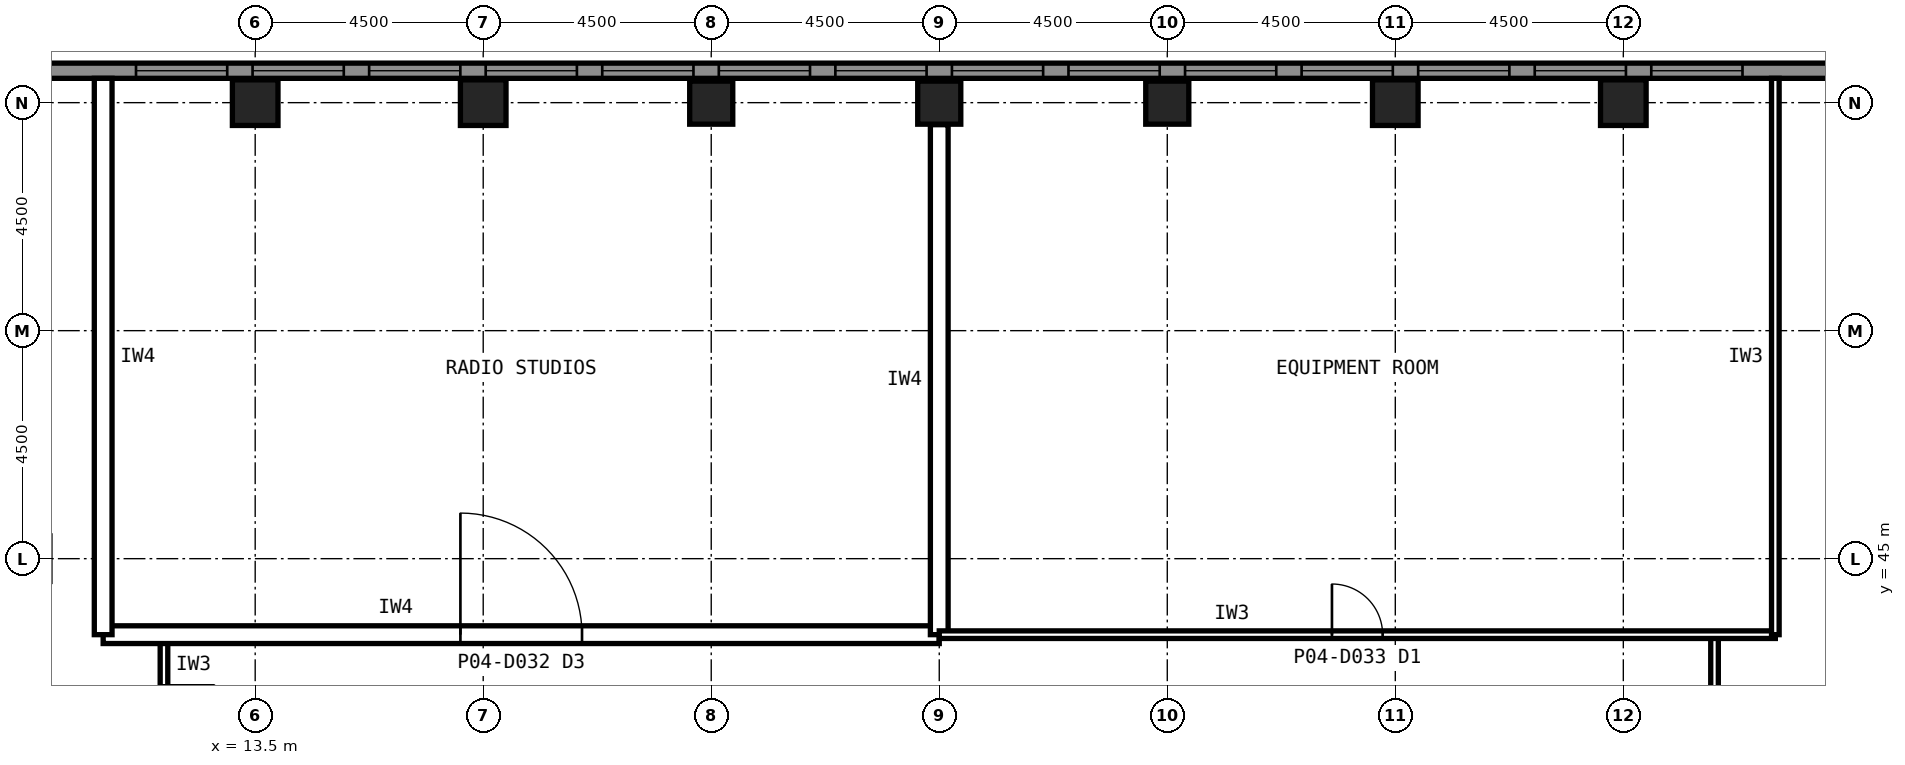
"""IFC4 building model, lengths in metres.
Left out: names, types, materials, properties, quantities, classifications, styles, units other than length and angle.
Written with IfcOpenShell. Run it as: python <this file> out.ifc"""

import sys

from ifc_helpers import new_model, si_unit, direction, frame, frame_2d, origin, origin_2d, place, context, subcontext, project, spatial, rectangle, hollow_rectangle, extrude, element, fill, save


model = new_model("IFC4")
c1 = context("Model", 3, precision=1e-05, world=origin(), true_north=direction((0.0, 1.0)))
c2 = subcontext(c1, "Body", "Model", "MODEL_VIEW")
j1 = project(units=[si_unit("LENGTHUNIT", "METRE"), si_unit("PLANEANGLEUNIT", "RADIAN")], contexts=[c1])
p1 = place(None, origin())
s1 = spatial("IfcSite", under=j1, at=p1, CompositionType="ELEMENT")
p2 = place(p1, origin())
s2 = spatial("IfcBuilding", under=s1, at=p2, CompositionType="ELEMENT")
p3 = place(p2, frame((0.0, 0.0, 18.0)))
s3 = spatial("IfcBuildingStorey", under=s2, at=p3, CompositionType="ELEMENT", Elevation=18.0)
for number, where, z_axis, x_axis in (
    (1, (40.5, 54.0, 0.0), (0.0, 0.0, 1.0), (1.0, 0.0, 0.0)),
    (2, (36.0, 54.0, 0.0), (0.0, 0.0, 1.0), (1.0, 0.0, 0.0)),
):
    element("IfcColumn", number, at=place(p3, frame(where, z_axis=z_axis, x_axis=x_axis)), inside=s3, PredefinedType="COLUMN", context=c2, shape_type="SweptSolid", body=[
        extrude(hollow_rectangle(XDim=0.9, YDim=0.9, WallThickness=0.063, at=origin_2d()), origin(), (0.0, 0.0, 1.0), 5.0),
    ])
for number, where, z_axis, x_axis in (
    (3, (31.5, 54.0, 0.0), (0.0, 0.0, 1.0), (1.0, 0.0, 0.0)),
    (4, (27.0, 54.0, 0.0), (0.0, 0.0, 1.0), (1.0, 0.0, 0.0)),
    (5, (22.5, 54.0, 0.0), (0.0, 0.0, 1.0), (1.0, 0.0, 0.0)),
):
    element("IfcColumn", number, at=place(p3, frame(where, z_axis=z_axis, x_axis=x_axis)), inside=s3, PredefinedType="COLUMN", context=c2, shape_type="SweptSolid", body=[
        extrude(hollow_rectangle(XDim=0.85, YDim=0.85, WallThickness=0.05, at=origin_2d()), origin(), (0.0, 0.0, 1.0), 5.0),
    ])
for number, where, z_axis, x_axis in (
    (6, (18.0, 54.0, 0.0), (0.0, 0.0, 1.0), (1.0, 0.0, 0.0)),
    (7, (13.5, 54.0, 0.0), (0.0, 0.0, 1.0), (1.0, 0.0, 0.0)),
):
    element("IfcColumn", number, at=place(p3, frame(where, z_axis=z_axis, x_axis=x_axis)), inside=s3, PredefinedType="COLUMN", context=c2, shape_type="SweptSolid", body=[
        extrude(hollow_rectangle(XDim=0.9, YDim=0.9, WallThickness=0.063, at=origin_2d()), origin(), (0.0, 0.0, 1.0), 5.0),
    ])
p4 = place(p3, frame((8.598, 54.63, 0.0), z_axis=(0.0, 0.0, 1.0), x_axis=(1.0, 0.0, 0.0)))
e8 = element("IfcWall", 8, at=p4, inside=s3, PredefinedType="SOLIDWALL", context=c2, shape_type="SweptSolid", body=[
    extrude(rectangle(XDim=36.805, YDim=0.3, at=frame_2d((18.402, 0.0))), origin(), (0.0, 0.0, 1.0), 5.0),
])
p5 = place(p4, frame((2.551, 0.0, 1.1)))
e9 = element("IfcOpeningElement", 9, at=p5, cuts=e8, PredefinedType="OPENING", context=c2, shape_type="SweptSolid", body=[
    extrude(rectangle(XDim=1.8, YDim=1.2, at=frame_2d((0.9, 0.6))), frame((0.0, 0.16, 0.0), z_axis=(0.0, -1.0, 0.0), x_axis=(1.0, 0.0, 0.0)), (0.0, 0.0, 1.0), 0.32),
])
p6 = place(p4, frame((4.851, 0.0, 1.1)))
e10 = element("IfcOpeningElement", 10, at=p6, cuts=e8, PredefinedType="OPENING", context=c2, shape_type="SweptSolid", body=[
    extrude(rectangle(XDim=1.8, YDim=1.2, at=frame_2d((0.9, 0.6))), frame((0.0, 0.16, 0.0), z_axis=(0.0, -1.0, 0.0), x_axis=(1.0, 0.0, 0.0)), (0.0, 0.0, 1.0), 0.32),
])
p7 = place(p4, frame((7.151, 0.0, 1.1)))
e11 = element("IfcOpeningElement", 11, at=p7, cuts=e8, PredefinedType="OPENING", context=c2, shape_type="SweptSolid", body=[
    extrude(rectangle(XDim=1.8, YDim=1.2, at=frame_2d((0.9, 0.6))), frame((0.0, 0.16, 0.0), z_axis=(0.0, -1.0, 0.0), x_axis=(1.0, 0.0, 0.0)), (0.0, 0.0, 1.0), 0.32),
])
p8 = place(p4, frame((9.451, 0.0, 1.1)))
e12 = element("IfcOpeningElement", 12, at=p8, cuts=e8, PredefinedType="OPENING", context=c2, shape_type="SweptSolid", body=[
    extrude(rectangle(XDim=1.8, YDim=1.2, at=frame_2d((0.9, 0.6))), frame((0.0, 0.16, 0.0), z_axis=(0.0, -1.0, 0.0), x_axis=(1.0, 0.0, 0.0)), (0.0, 0.0, 1.0), 0.32),
])
p9 = place(p4, frame((11.752, 0.0, 1.1)))
e13 = element("IfcOpeningElement", 13, at=p9, cuts=e8, PredefinedType="OPENING", context=c2, shape_type="SweptSolid", body=[
    extrude(rectangle(XDim=1.8, YDim=1.2, at=frame_2d((0.9, 0.6))), frame((0.0, 0.16, 0.0), z_axis=(0.0, -1.0, 0.0), x_axis=(1.0, 0.0, 0.0)), (0.0, 0.0, 1.0), 0.32),
])
p10 = place(p4, frame((14.052, 0.0, 1.1)))
e14 = element("IfcOpeningElement", 14, at=p10, cuts=e8, PredefinedType="OPENING", context=c2, shape_type="SweptSolid", body=[
    extrude(rectangle(XDim=1.8, YDim=1.2, at=frame_2d((0.9, 0.6))), frame((0.0, 0.16, 0.0), z_axis=(0.0, -1.0, 0.0), x_axis=(1.0, 0.0, 0.0)), (0.0, 0.0, 1.0), 0.32),
])
p11 = place(p4, frame((16.352, 0.0, 1.1)))
e15 = element("IfcOpeningElement", 15, at=p11, cuts=e8, PredefinedType="OPENING", context=c2, shape_type="SweptSolid", body=[
    extrude(rectangle(XDim=1.8, YDim=1.2, at=frame_2d((0.9, 0.6))), frame((0.0, 0.16, 0.0), z_axis=(0.0, -1.0, 0.0), x_axis=(1.0, 0.0, 0.0)), (0.0, 0.0, 1.0), 0.32),
])
p12 = place(p4, frame((18.653, 0.0, 1.1)))
e16 = element("IfcOpeningElement", 16, at=p12, cuts=e8, PredefinedType="OPENING", context=c2, shape_type="SweptSolid", body=[
    extrude(rectangle(XDim=1.8, YDim=1.2, at=frame_2d((0.9, 0.6))), frame((0.0, 0.16, 0.0), z_axis=(0.0, -1.0, 0.0), x_axis=(1.0, 0.0, 0.0)), (0.0, 0.0, 1.0), 0.32),
])
p13 = place(p4, frame((20.953, 0.0, 1.1)))
e17 = element("IfcOpeningElement", 17, at=p13, cuts=e8, PredefinedType="OPENING", context=c2, shape_type="SweptSolid", body=[
    extrude(rectangle(XDim=1.8, YDim=1.2, at=frame_2d((0.9, 0.6))), frame((0.0, 0.16, 0.0), z_axis=(0.0, -1.0, 0.0), x_axis=(1.0, 0.0, 0.0)), (0.0, 0.0, 1.0), 0.32),
])
p14 = place(p4, frame((23.253, 0.0, 1.1)))
e18 = element("IfcOpeningElement", 18, at=p14, cuts=e8, PredefinedType="OPENING", context=c2, shape_type="SweptSolid", body=[
    extrude(rectangle(XDim=1.8, YDim=1.2, at=frame_2d((0.9, 0.6))), frame((0.0, 0.16, 0.0), z_axis=(0.0, -1.0, 0.0), x_axis=(1.0, 0.0, 0.0)), (0.0, 0.0, 1.0), 0.32),
])
p15 = place(p4, frame((25.553, 0.0, 1.1)))
e19 = element("IfcOpeningElement", 19, at=p15, cuts=e8, PredefinedType="OPENING", context=c2, shape_type="SweptSolid", body=[
    extrude(rectangle(XDim=1.8, YDim=1.2, at=frame_2d((0.9, 0.6))), frame((0.0, 0.16, 0.0), z_axis=(0.0, -1.0, 0.0), x_axis=(1.0, 0.0, 0.0)), (0.0, 0.0, 1.0), 0.32),
])
p16 = place(p4, frame((27.854, 0.0, 1.1)))
e20 = element("IfcOpeningElement", 20, at=p16, cuts=e8, PredefinedType="OPENING", context=c2, shape_type="SweptSolid", body=[
    extrude(rectangle(XDim=1.8, YDim=1.2, at=frame_2d((0.9, 0.6))), frame((0.0, 0.16, 0.0), z_axis=(0.0, -1.0, 0.0), x_axis=(1.0, 0.0, 0.0)), (0.0, 0.0, 1.0), 0.32),
])
p17 = place(p4, frame((30.154, 0.0, 1.1)))
e21 = element("IfcOpeningElement", 21, at=p17, cuts=e8, PredefinedType="OPENING", context=c2, shape_type="SweptSolid", body=[
    extrude(rectangle(XDim=1.8, YDim=1.2, at=frame_2d((0.9, 0.6))), frame((0.0, 0.16, 0.0), z_axis=(0.0, -1.0, 0.0), x_axis=(1.0, 0.0, 0.0)), (0.0, 0.0, 1.0), 0.32),
])
p18 = place(p4, frame((32.454, 0.0, 1.1)))
e22 = element("IfcOpeningElement", 22, at=p18, cuts=e8, PredefinedType="OPENING", context=c2, shape_type="SweptSolid", body=[
    extrude(rectangle(XDim=1.8, YDim=1.2, at=frame_2d((0.9, 0.6))), frame((0.0, 0.16, 0.0), z_axis=(0.0, -1.0, 0.0), x_axis=(1.0, 0.0, 0.0)), (0.0, 0.0, 1.0), 0.32),
])
p19 = place(p3, frame((42.3, 36.0, 0.0), z_axis=(0.0, 0.0, 1.0), x_axis=(0.0, 1.0, 0.0)))
e23 = element("IfcWall", 23, at=p19, inside=s3, PredefinedType="PARTITIONING", context=c2, shape_type="SweptSolid", body=[
    extrude(rectangle(XDim=7.5, YDim=0.15, at=frame_2d((3.75, 0.0))), origin(), (0.0, 0.0, 1.0), 4.8),
])
p20 = place(p19, frame((3.25, 0.0, 0.0)))
e24 = element("IfcOpeningElement", 24, at=p20, cuts=e23, PredefinedType="OPENING", context=c2, shape_type="SweptSolid", body=[
    extrude(rectangle(XDim=1.0, YDim=2.1, at=frame_2d((0.5, 1.05))), frame((0.0, 0.085, 0.0), z_axis=(0.0, -1.0, 0.0), x_axis=(1.0, 0.0, 0.0)), (0.0, 0.0, 1.0), 0.17),
])
p21 = place(p3, frame((11.7, 43.5, 0.0), z_axis=(0.0, 0.0, 1.0), x_axis=(0.0, -1.0, 0.0)))
e25 = element("IfcWall", 25, at=p21, inside=s3, PredefinedType="PARTITIONING", context=c2, shape_type="SweptSolid", body=[
    extrude(rectangle(XDim=3.0, YDim=0.15, at=frame_2d((1.5, 0.0))), origin(), (0.0, 0.0, 1.0), 4.8),
])
p22 = place(p21, frame((1.0, 0.0, 0.0)))
e26 = element("IfcOpeningElement", 26, at=p22, cuts=e25, PredefinedType="OPENING", context=c2, shape_type="SweptSolid", body=[
    extrude(rectangle(XDim=1.0, YDim=2.1, at=frame_2d((0.5, 1.05))), frame((0.0, 0.085, 0.0), z_axis=(0.0, -1.0, 0.0), x_axis=(1.0, 0.0, 0.0)), (0.0, 0.0, 1.0), 0.17),
])
p23 = place(p3, frame((10.5, 43.5, 0.0), z_axis=(0.0, 0.0, 1.0), x_axis=(1.0, 0.0, 0.0)))
e27 = element("IfcWall", 27, at=p23, inside=s3, PredefinedType="PARTITIONING", context=c2, shape_type="SweptSolid", body=[
    extrude(rectangle(XDim=16.5, YDim=0.35, at=frame_2d((8.25, 0.0))), origin(), (0.0, 0.0, 1.0), 4.8),
])
p24 = place(p23, frame((7.05, 0.0, 0.0)))
e28 = element("IfcOpeningElement", 28, at=p24, cuts=e27, PredefinedType="OPENING", context=c2, shape_type="SweptSolid", body=[
    extrude(rectangle(XDim=2.4, YDim=3.0, at=frame_2d((1.2, 1.5))), frame((0.0, 0.185, 0.0), z_axis=(0.0, -1.0, 0.0), x_axis=(1.0, 0.0, 0.0)), (0.0, 0.0, 1.0), 0.37),
])
p25 = place(p3, frame((27.0, 43.5, 0.0), z_axis=(0.0, 0.0, 1.0), x_axis=(0.0, 1.0, 0.0)))
e29 = element("IfcWall", 29, at=p25, inside=s3, PredefinedType="PARTITIONING", context=c2, shape_type="SweptSolid", body=[
    extrude(rectangle(XDim=10.065, YDim=0.35, at=frame_2d((5.032, 0.0))), origin(), (0.0, 0.0, 1.0), 3.858),
])
p26 = place(p3, frame((10.5, 54.48, 0.0), z_axis=(0.0, 0.0, 1.0), x_axis=(0.0, -1.0, 0.0)))
e30 = element("IfcWall", 30, at=p26, inside=s3, PredefinedType="PARTITIONING", context=c2, shape_type="SweptSolid", body=[
    extrude(rectangle(XDim=10.98, YDim=0.35, at=frame_2d((5.49, 0.0))), origin(), (0.0, 0.0, 1.0), 4.8),
])
p27 = place(p3, frame((27.0, 43.5, 0.0), z_axis=(0.0, 0.0, 1.0), x_axis=(1.0, 0.0, 0.0)))
e31 = element("IfcWall", 31, at=p27, inside=s3, PredefinedType="PARTITIONING", context=c2, shape_type="SweptSolid", body=[
    extrude(rectangle(XDim=16.5, YDim=0.15, at=frame_2d((8.25, 0.0))), origin(), (0.0, 0.0, 1.0), 4.8),
])
p28 = place(p27, frame((7.75, 0.0, 0.0)))
e32 = element("IfcOpeningElement", 32, at=p28, cuts=e31, PredefinedType="OPENING", context=c2, shape_type="SweptSolid", body=[
    extrude(rectangle(XDim=1.0, YDim=2.1, at=frame_2d((0.5, 1.05))), frame((0.0, 0.085, 0.0), z_axis=(0.0, -1.0, 0.0), x_axis=(1.0, 0.0, 0.0)), (0.0, 0.0, 1.0), 0.17),
])
p29 = place(p3, frame((43.5, 43.5, 0.0), z_axis=(0.0, 0.0, 1.0), x_axis=(0.0, 1.0, 0.0)))
e33 = element("IfcWall", 33, at=p29, inside=s3, PredefinedType="PARTITIONING", context=c2, shape_type="SweptSolid", body=[
    extrude(rectangle(XDim=10.98, YDim=0.15, at=frame_2d((5.49, 0.0))), origin(), (0.0, 0.0, 1.0), 4.8),
])
p30 = place(p5, origin())
e34 = element("IfcWindow", 34, at=p30, inside=s3, PartitioningType="SINGLE_PANEL", PredefinedType="WINDOW", context=c2, shape_type="SweptSolid", body=[
    extrude(rectangle(XDim=1.8, YDim=1.2, at=frame_2d((0.9, 0.6))), frame((0.0, 0.03, 0.0), z_axis=(0.0, -1.0, 0.0), x_axis=(1.0, 0.0, 0.0)), (0.0, 0.0, 1.0), 0.06),
])
fill(e9, e34)
p31 = place(p6, origin())
e35 = element("IfcWindow", 35, at=p31, inside=s3, PartitioningType="SINGLE_PANEL", PredefinedType="WINDOW", context=c2, shape_type="SweptSolid", body=[
    extrude(rectangle(XDim=1.8, YDim=1.2, at=frame_2d((0.9, 0.6))), frame((0.0, 0.03, 0.0), z_axis=(0.0, -1.0, 0.0), x_axis=(1.0, 0.0, 0.0)), (0.0, 0.0, 1.0), 0.06),
])
fill(e10, e35)
p32 = place(p7, origin())
e36 = element("IfcWindow", 36, at=p32, inside=s3, PartitioningType="SINGLE_PANEL", PredefinedType="WINDOW", context=c2, shape_type="SweptSolid", body=[
    extrude(rectangle(XDim=1.8, YDim=1.2, at=frame_2d((0.9, 0.6))), frame((0.0, 0.03, 0.0), z_axis=(0.0, -1.0, 0.0), x_axis=(1.0, 0.0, 0.0)), (0.0, 0.0, 1.0), 0.06),
])
fill(e11, e36)
p33 = place(p8, origin())
e37 = element("IfcWindow", 37, at=p33, inside=s3, PartitioningType="SINGLE_PANEL", PredefinedType="WINDOW", context=c2, shape_type="SweptSolid", body=[
    extrude(rectangle(XDim=1.8, YDim=1.2, at=frame_2d((0.9, 0.6))), frame((0.0, 0.03, 0.0), z_axis=(0.0, -1.0, 0.0), x_axis=(1.0, 0.0, 0.0)), (0.0, 0.0, 1.0), 0.06),
])
fill(e12, e37)
p34 = place(p9, origin())
e38 = element("IfcWindow", 38, at=p34, inside=s3, PartitioningType="SINGLE_PANEL", PredefinedType="WINDOW", context=c2, shape_type="SweptSolid", body=[
    extrude(rectangle(XDim=1.8, YDim=1.2, at=frame_2d((0.9, 0.6))), frame((0.0, 0.03, 0.0), z_axis=(0.0, -1.0, 0.0), x_axis=(1.0, 0.0, 0.0)), (0.0, 0.0, 1.0), 0.06),
])
fill(e13, e38)
p35 = place(p10, origin())
e39 = element("IfcWindow", 39, at=p35, inside=s3, PartitioningType="SINGLE_PANEL", PredefinedType="WINDOW", context=c2, shape_type="SweptSolid", body=[
    extrude(rectangle(XDim=1.8, YDim=1.2, at=frame_2d((0.9, 0.6))), frame((0.0, 0.03, 0.0), z_axis=(0.0, -1.0, 0.0), x_axis=(1.0, 0.0, 0.0)), (0.0, 0.0, 1.0), 0.06),
])
fill(e14, e39)
p36 = place(p11, origin())
e40 = element("IfcWindow", 40, at=p36, inside=s3, PartitioningType="SINGLE_PANEL", PredefinedType="WINDOW", context=c2, shape_type="SweptSolid", body=[
    extrude(rectangle(XDim=1.8, YDim=1.2, at=frame_2d((0.9, 0.6))), frame((0.0, 0.03, 0.0), z_axis=(0.0, -1.0, 0.0), x_axis=(1.0, 0.0, 0.0)), (0.0, 0.0, 1.0), 0.06),
])
fill(e15, e40)
p37 = place(p12, origin())
e41 = element("IfcWindow", 41, at=p37, inside=s3, PartitioningType="SINGLE_PANEL", PredefinedType="WINDOW", context=c2, shape_type="SweptSolid", body=[
    extrude(rectangle(XDim=1.8, YDim=1.2, at=frame_2d((0.9, 0.6))), frame((0.0, 0.03, 0.0), z_axis=(0.0, -1.0, 0.0), x_axis=(1.0, 0.0, 0.0)), (0.0, 0.0, 1.0), 0.06),
])
fill(e16, e41)
p38 = place(p13, origin())
e42 = element("IfcWindow", 42, at=p38, inside=s3, PartitioningType="SINGLE_PANEL", PredefinedType="WINDOW", context=c2, shape_type="SweptSolid", body=[
    extrude(rectangle(XDim=1.8, YDim=1.2, at=frame_2d((0.9, 0.6))), frame((0.0, 0.03, 0.0), z_axis=(0.0, -1.0, 0.0), x_axis=(1.0, 0.0, 0.0)), (0.0, 0.0, 1.0), 0.06),
])
fill(e17, e42)
p39 = place(p14, origin())
e43 = element("IfcWindow", 43, at=p39, inside=s3, PartitioningType="SINGLE_PANEL", PredefinedType="WINDOW", context=c2, shape_type="SweptSolid", body=[
    extrude(rectangle(XDim=1.8, YDim=1.2, at=frame_2d((0.9, 0.6))), frame((0.0, 0.03, 0.0), z_axis=(0.0, -1.0, 0.0), x_axis=(1.0, 0.0, 0.0)), (0.0, 0.0, 1.0), 0.06),
])
fill(e18, e43)
p40 = place(p15, origin())
e44 = element("IfcWindow", 44, at=p40, inside=s3, PartitioningType="SINGLE_PANEL", PredefinedType="WINDOW", context=c2, shape_type="SweptSolid", body=[
    extrude(rectangle(XDim=1.8, YDim=1.2, at=frame_2d((0.9, 0.6))), frame((0.0, 0.03, 0.0), z_axis=(0.0, -1.0, 0.0), x_axis=(1.0, 0.0, 0.0)), (0.0, 0.0, 1.0), 0.06),
])
fill(e19, e44)
p41 = place(p16, origin())
e45 = element("IfcWindow", 45, at=p41, inside=s3, PartitioningType="SINGLE_PANEL", PredefinedType="WINDOW", context=c2, shape_type="SweptSolid", body=[
    extrude(rectangle(XDim=1.8, YDim=1.2, at=frame_2d((0.9, 0.6))), frame((0.0, 0.03, 0.0), z_axis=(0.0, -1.0, 0.0), x_axis=(1.0, 0.0, 0.0)), (0.0, 0.0, 1.0), 0.06),
])
fill(e20, e45)
p42 = place(p17, origin())
e46 = element("IfcWindow", 46, at=p42, inside=s3, PartitioningType="SINGLE_PANEL", PredefinedType="WINDOW", context=c2, shape_type="SweptSolid", body=[
    extrude(rectangle(XDim=1.8, YDim=1.2, at=frame_2d((0.9, 0.6))), frame((0.0, 0.03, 0.0), z_axis=(0.0, -1.0, 0.0), x_axis=(1.0, 0.0, 0.0)), (0.0, 0.0, 1.0), 0.06),
])
fill(e21, e46)
p43 = place(p18, origin())
e47 = element("IfcWindow", 47, at=p43, inside=s3, PartitioningType="SINGLE_PANEL", PredefinedType="WINDOW", context=c2, shape_type="SweptSolid", body=[
    extrude(rectangle(XDim=1.8, YDim=1.2, at=frame_2d((0.9, 0.6))), frame((0.0, 0.03, 0.0), z_axis=(0.0, -1.0, 0.0), x_axis=(1.0, 0.0, 0.0)), (0.0, 0.0, 1.0), 0.06),
])
fill(e22, e47)
p44 = place(p24, origin())
e48 = element("IfcDoor", 48, at=p44, inside=s3, OperationType="SINGLE_SWING_LEFT", PredefinedType="DOOR", context=c2, shape_type="SweptSolid", body=[
    extrude(rectangle(XDim=2.4, YDim=3.0, at=frame_2d((1.2, 1.5))), frame((0.0, 0.025, 0.0), z_axis=(0.0, -1.0, 0.0), x_axis=(1.0, 0.0, 0.0)), (0.0, 0.0, 1.0), 0.05),
])
fill(e28, e48)
p45 = place(p28, origin())
e49 = element("IfcDoor", 49, at=p45, inside=s3, OperationType="SINGLE_SWING_LEFT", PredefinedType="DOOR", context=c2, shape_type="SweptSolid", body=[
    extrude(rectangle(XDim=1.0, YDim=2.1, at=frame_2d((0.5, 1.05))), frame((0.0, 0.025, 0.0), z_axis=(0.0, -1.0, 0.0), x_axis=(1.0, 0.0, 0.0)), (0.0, 0.0, 1.0), 0.05),
])
fill(e32, e49)
save(model, sys.argv[1])
